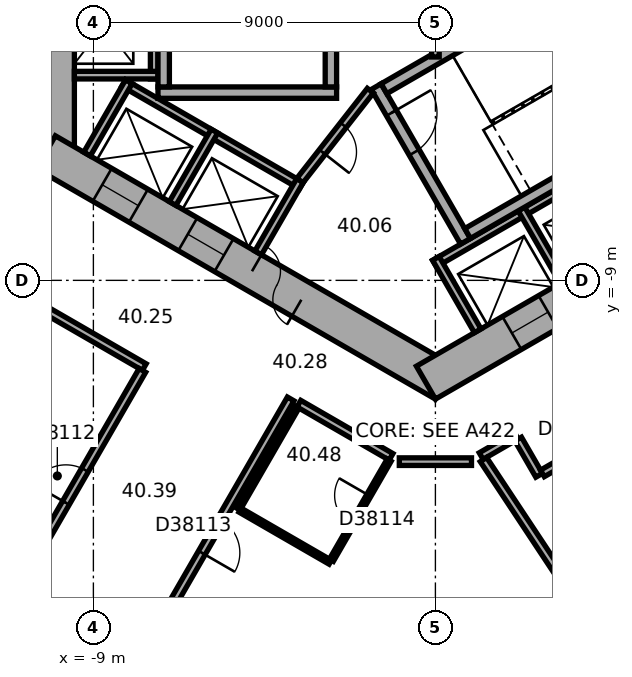
"""IFC4 building model, lengths in metres.
Left out: names, types, materials, properties, quantities, classifications, styles, units other than length and angle.
Written with IfcOpenShell. Run it as: python <this file> out.ifc"""

import sys

from ifc_helpers import new_model, si_unit, direction, frame, frame_2d, origin, place, context, subcontext, project, spatial, rectangle, extrude, element, fill, save


model = new_model("IFC4")
c1 = context("Model", 3, precision=1e-05, world=origin(), true_north=direction((0.0, 1.0)))
c2 = subcontext(c1, "Body", "Model", "MODEL_VIEW")
j1 = project(units=[si_unit("LENGTHUNIT", "METRE"), si_unit("PLANEANGLEUNIT", "RADIAN")], contexts=[c1])
p1 = place(None, origin())
s1 = spatial("IfcSite", under=j1, at=p1, CompositionType="ELEMENT")
p2 = place(p1, origin())
s2 = spatial("IfcBuilding", under=s1, at=p2, CompositionType="ELEMENT")
p3 = place(p2, frame((0.0, 0.0, 165.1)))
s3 = spatial("IfcBuildingStorey", under=s2, at=p3, CompositionType="ELEMENT", Elevation=165.1)
p4 = place(p3, frame((-10.0, 6.062, 0.0), z_axis=(0.0, 0.0, 1.0), x_axis=(0.0, -1.0, 0.0)))
e1 = element("IfcWall", 1, at=p4, inside=s3, PredefinedType="SHEAR", context=c2, shape_type="SweptSolid", body=[
    extrude(rectangle(XDim=12.125, YDim=1.0, at=frame_2d((6.062, 0.0))), origin(), (0.0, 0.0, 1.0), 3.7),
])
p5 = place(p4, frame((5.212, 0.0, 0.0)))
e2 = element("IfcOpeningElement", 2, at=p5, cuts=e1, PredefinedType="OPENING", context=c2, shape_type="SweptSolid", body=[
    extrude(rectangle(XDim=1.1, YDim=2.1, at=frame_2d((0.55, 1.05))), frame((0.0, 0.51, 0.0), z_axis=(0.0, -1.0, 0.0), x_axis=(1.0, 0.0, 0.0)), (0.0, 0.0, 1.0), 1.02),
])
p6 = place(p4, frame((7.812, 0.0, 0.0)))
e3 = element("IfcOpeningElement", 3, at=p6, cuts=e1, PredefinedType="OPENING", context=c2, shape_type="SweptSolid", body=[
    extrude(rectangle(XDim=1.1, YDim=2.1, at=frame_2d((0.55, 1.05))), frame((0.0, 0.51, 0.0), z_axis=(0.0, -1.0, 0.0), x_axis=(1.0, 0.0, 0.0)), (0.0, 0.0, 1.0), 1.02),
])
p7 = place(p3, frame((-10.25, -5.629, 0.0), z_axis=(0.0, 0.0, 1.0), x_axis=(0.866022616891, -0.50000482701, 0.0)))
e4 = element("IfcWall", 4, at=p7, inside=s3, PredefinedType="SHEAR", context=c2, shape_type="SweptSolid", body=[
    extrude(rectangle(XDim=12.125, YDim=1.0, at=frame_2d((6.062, 0.0))), origin(), (0.0, 0.0, 1.0), 3.7),
])
p8 = place(p7, frame((6.262, 0.0, 0.0)))
e5 = element("IfcOpeningElement", 5, at=p8, cuts=e4, PredefinedType="OPENING", context=c2, shape_type="SweptSolid", body=[
    extrude(rectangle(XDim=1.5, YDim=2.1, at=frame_2d((0.75, 1.05))), frame((0.0, 0.51, 0.0), z_axis=(0.0, -1.0, 0.0), x_axis=(1.0, 0.0, 0.0)), (0.0, 0.0, 1.0), 1.02),
])
p9 = place(p7, frame((1.712, 0.0, 0.0)))
e6 = element("IfcOpeningElement", 6, at=p9, cuts=e4, PredefinedType="OPENING", context=c2, shape_type="SweptSolid", body=[
    extrude(rectangle(XDim=1.1, YDim=2.1, at=frame_2d((0.55, 1.05))), frame((0.0, 0.51, 0.0), z_axis=(0.0, -1.0, 0.0), x_axis=(1.0, 0.0, 0.0)), (0.0, 0.0, 1.0), 1.02),
])
p10 = place(p7, frame((4.312, 0.0, 0.0)))
e7 = element("IfcOpeningElement", 7, at=p10, cuts=e4, PredefinedType="OPENING", context=c2, shape_type="SweptSolid", body=[
    extrude(rectangle(XDim=1.1, YDim=2.1, at=frame_2d((0.55, 1.05))), frame((0.0, 0.51, 0.0), z_axis=(0.0, -1.0, 0.0), x_axis=(1.0, 0.0, 0.0)), (0.0, 0.0, 1.0), 1.02),
])
p11 = place(p3, frame((-0.25, -11.691, 0.0), z_axis=(0.0, 0.0, 1.0), x_axis=(0.866022616891, 0.50000482701, 0.0)))
e8 = element("IfcWall", 8, at=p11, inside=s3, PredefinedType="SHEAR", context=c2, shape_type="SweptSolid", body=[
    extrude(rectangle(XDim=12.125, YDim=1.0, at=frame_2d((6.062, 0.0))), origin(), (0.0, 0.0, 1.0), 3.7),
])
p12 = place(p11, frame((2.612, 0.0, 0.0)))
e9 = element("IfcOpeningElement", 9, at=p12, cuts=e8, PredefinedType="OPENING", context=c2, shape_type="SweptSolid", body=[
    extrude(rectangle(XDim=1.1, YDim=2.1, at=frame_2d((0.55, 1.05))), frame((0.0, 0.51, 0.0), z_axis=(0.0, -1.0, 0.0), x_axis=(1.0, 0.0, 0.0)), (0.0, 0.0, 1.0), 1.02),
])
p13 = place(p11, frame((5.212, 0.0, 0.0)))
e10 = element("IfcOpeningElement", 10, at=p13, cuts=e8, PredefinedType="OPENING", context=c2, shape_type="SweptSolid", body=[
    extrude(rectangle(XDim=1.1, YDim=2.1, at=frame_2d((0.55, 1.05))), frame((0.0, 0.51, 0.0), z_axis=(0.0, -1.0, 0.0), x_axis=(1.0, 0.0, 0.0)), (0.0, 0.0, 1.0), 1.02),
])
p14 = place(p11, frame((7.812, 0.0, 0.0)))
e11 = element("IfcOpeningElement", 11, at=p14, cuts=e8, PredefinedType="OPENING", context=c2, shape_type="SweptSolid", body=[
    extrude(rectangle(XDim=1.1, YDim=2.1, at=frame_2d((0.55, 1.05))), frame((0.0, 0.51, 0.0), z_axis=(0.0, -1.0, 0.0), x_axis=(1.0, 0.0, 0.0)), (0.0, 0.0, 1.0), 1.02),
])
p15 = place(p3, frame((-18.789, -14.267, 0.0), z_axis=(0.0, 0.0, 1.0), x_axis=(0.866023315909, -0.500003616288, 0.0)))
e12 = element("IfcWall", 12, at=p15, inside=s3, PredefinedType="STANDARD", context=c2, shape_type="SweptSolid", body=[
    extrude(rectangle(XDim=20.044, YDim=0.2, at=frame_2d((10.022, 0.0))), origin(), (0.0, 0.0, 1.0), 3.7),
])
p16 = place(p15, frame((1.314, 0.0, 0.9)))
e13 = element("IfcOpeningElement", 13, at=p16, cuts=e12, PredefinedType="OPENING", context=c2, shape_type="SweptSolid", body=[
    extrude(rectangle(XDim=2.4, YDim=2.0, at=frame_2d((1.2, 1.0))), frame((0.0, 0.11, 0.0), z_axis=(0.0, -1.0, 0.0), x_axis=(1.0, 0.0, 0.0)), (0.0, 0.0, 1.0), 0.22),
])
p17 = place(p15, frame((5.069, 0.0, 0.9)))
e14 = element("IfcOpeningElement", 14, at=p17, cuts=e12, PredefinedType="OPENING", context=c2, shape_type="SweptSolid", body=[
    extrude(rectangle(XDim=2.4, YDim=2.0, at=frame_2d((1.2, 1.0))), frame((0.0, 0.11, 0.0), z_axis=(0.0, -1.0, 0.0), x_axis=(1.0, 0.0, 0.0)), (0.0, 0.0, 1.0), 0.22),
])
p18 = place(p15, frame((8.823, 0.0, 0.9)))
e15 = element("IfcOpeningElement", 15, at=p18, cuts=e12, PredefinedType="OPENING", context=c2, shape_type="SweptSolid", body=[
    extrude(rectangle(XDim=2.4, YDim=2.0, at=frame_2d((1.2, 1.0))), frame((0.0, 0.11, 0.0), z_axis=(0.0, -1.0, 0.0), x_axis=(1.0, 0.0, 0.0)), (0.0, 0.0, 1.0), 0.22),
])
p19 = place(p15, frame((12.577, 0.0, 0.9)))
e16 = element("IfcOpeningElement", 16, at=p19, cuts=e12, PredefinedType="OPENING", context=c2, shape_type="SweptSolid", body=[
    extrude(rectangle(XDim=2.4, YDim=2.0, at=frame_2d((1.2, 1.0))), frame((0.0, 0.11, 0.0), z_axis=(0.0, -1.0, 0.0), x_axis=(1.0, 0.0, 0.0)), (0.0, 0.0, 1.0), 0.22),
])
p20 = place(p15, frame((16.331, 0.0, 0.9)))
e17 = element("IfcOpeningElement", 17, at=p20, cuts=e12, PredefinedType="OPENING", context=c2, shape_type="SweptSolid", body=[
    extrude(rectangle(XDim=2.4, YDim=2.0, at=frame_2d((1.2, 1.0))), frame((0.0, 0.11, 0.0), z_axis=(0.0, -1.0, 0.0), x_axis=(1.0, 0.0, 0.0)), (0.0, 0.0, 1.0), 0.22),
])
p21 = place(p3, frame((2.911, -24.156, 0.0), z_axis=(0.0, 0.0, 1.0), x_axis=(0.833882163564, 0.551942512668, 0.0)))
e18 = element("IfcWall", 18, at=p21, inside=s3, PredefinedType="STANDARD", context=c2, shape_type="SweptSolid", body=[
    extrude(rectangle(XDim=20.044, YDim=0.2, at=frame_2d((10.022, 0.0))), origin(), (0.0, 0.0, 1.0), 3.7),
])
p22 = place(p21, frame((1.313, 0.0, 0.9)))
e19 = element("IfcOpeningElement", 19, at=p22, cuts=e18, PredefinedType="OPENING", context=c2, shape_type="SweptSolid", body=[
    extrude(rectangle(XDim=2.4, YDim=2.0, at=frame_2d((1.2, 1.0))), frame((0.0, 0.11, 0.0), z_axis=(0.0, -1.0, 0.0), x_axis=(1.0, 0.0, 0.0)), (0.0, 0.0, 1.0), 0.22),
])
p23 = place(p21, frame((5.067, 0.0, 0.9)))
e20 = element("IfcOpeningElement", 20, at=p23, cuts=e18, PredefinedType="OPENING", context=c2, shape_type="SweptSolid", body=[
    extrude(rectangle(XDim=2.4, YDim=2.0, at=frame_2d((1.2, 1.0))), frame((0.0, 0.11, 0.0), z_axis=(0.0, -1.0, 0.0), x_axis=(1.0, 0.0, 0.0)), (0.0, 0.0, 1.0), 0.22),
])
p24 = place(p21, frame((8.821, 0.0, 0.9)))
e21 = element("IfcOpeningElement", 21, at=p24, cuts=e18, PredefinedType="OPENING", context=c2, shape_type="SweptSolid", body=[
    extrude(rectangle(XDim=2.4, YDim=2.0, at=frame_2d((1.2, 1.0))), frame((0.0, 0.11, 0.0), z_axis=(0.0, -1.0, 0.0), x_axis=(1.0, 0.0, 0.0)), (0.0, 0.0, 1.0), 0.22),
])
p25 = place(p21, frame((12.575, 0.0, 0.9)))
e22 = element("IfcOpeningElement", 22, at=p25, cuts=e18, PredefinedType="OPENING", context=c2, shape_type="SweptSolid", body=[
    extrude(rectangle(XDim=2.4, YDim=2.0, at=frame_2d((1.2, 1.0))), frame((0.0, 0.11, 0.0), z_axis=(0.0, -1.0, 0.0), x_axis=(1.0, 0.0, 0.0)), (0.0, 0.0, 1.0), 0.22),
])
p26 = place(p21, frame((16.329, 0.0, 0.9)))
e23 = element("IfcOpeningElement", 23, at=p26, cuts=e18, PredefinedType="OPENING", context=c2, shape_type="SweptSolid", body=[
    extrude(rectangle(XDim=2.4, YDim=2.0, at=frame_2d((1.2, 1.0))), frame((0.0, 0.11, 0.0), z_axis=(0.0, -1.0, 0.0), x_axis=(1.0, 0.0, 0.0)), (0.0, 0.0, 1.0), 0.22),
])
p27 = place(p3, frame((-7.4, 4.3, 0.0), z_axis=(0.0, 0.0, 1.0), x_axis=(0.0, -1.0, 0.0)))
e24 = element("IfcWall", 24, at=p27, inside=s3, PredefinedType="PARTITIONING", context=c2, shape_type="SweptSolid", body=[
    extrude(rectangle(XDim=8.0, YDim=0.2, at=frame_2d((4.0, 0.0))), origin(), (0.0, 0.0, 1.0), 3.42),
])
p28 = place(p3, frame((-7.3, -3.6, 0.0), z_axis=(0.0, 0.0, 1.0), x_axis=(-1.0, 0.0, 0.0)))
e25 = element("IfcWall", 25, at=p28, inside=s3, PredefinedType="PARTITIONING", context=c2, shape_type="SweptSolid", body=[
    extrude(rectangle(XDim=2.2, YDim=0.2, at=frame_2d((1.1, 0.0))), origin(), (0.0, 0.0, 1.0), 3.42),
])
p29 = place(p3, frame((-8.203, -3.809, 0.0), z_axis=(0.0, 0.0, 1.0), x_axis=(0.866028230842, -0.499995103361, 0.0)))
e26 = element("IfcWall", 26, at=p29, inside=s3, PredefinedType="PARTITIONING", context=c2, shape_type="SweptSolid", body=[
    extrude(rectangle(XDim=5.4, YDim=0.2, at=frame_2d((2.7, 0.0))), origin(), (0.0, 0.0, 1.0), 3.42),
])
for number, where, z_axis, x_axis in (
    (27, (-8.067, -3.772, 0.0), (0.0, 0.0, 1.0), (-0.5, -0.866, 0.0)),
    (28, (-5.815, -5.072, 0.0), (0.0, 0.0, 1.0), (-0.5, -0.866, 0.0)),
):
    element("IfcWall", number, at=place(p3, frame(where, z_axis=z_axis, x_axis=x_axis)), inside=s3, PredefinedType="PARTITIONING", context=c2, shape_type="SweptSolid", body=[
        extrude(rectangle(XDim=2.2, YDim=0.2, at=frame_2d((1.1, 0.0))), origin(), (0.0, 0.0, 1.0), 3.42),
    ])
p30 = place(p3, frame((-3.563, -6.372, 0.0), z_axis=(0.0, 0.0, 1.0), x_axis=(-0.499994660107, -0.866028486751, 0.0)))
e29 = element("IfcWall", 29, at=p30, inside=s3, PredefinedType="PARTITIONING", context=c2, shape_type="SweptSolid", body=[
    extrude(rectangle(XDim=2.2, YDim=0.2, at=frame_2d((1.1, 0.0))), origin(), (0.0, 0.0, 1.0), 3.42),
])
p31 = place(p3, frame((-0.024, -8.559, 0.0), z_axis=(0.0, 0.0, 1.0), x_axis=(0.866026010844, 0.49999894854, 0.0)))
e30 = element("IfcWall", 30, at=p31, inside=s3, PredefinedType="PARTITIONING", context=c2, shape_type="SweptSolid", body=[
    extrude(rectangle(XDim=8.0, YDim=0.2, at=frame_2d((4.0, 0.0))), origin(), (0.0, 0.0, 1.0), 3.42),
])
for number, where, z_axis, x_axis in (
    (31, (0.013, -8.422, 0.0), (0.0, 0.0, 1.0), (0.5, -0.866, 0.0)),
    (32, (2.264, -7.122, 0.0), (0.0, 0.0, 1.0), (0.5, -0.866, 0.0)),
):
    element("IfcWall", number, at=place(p3, frame(where, z_axis=z_axis, x_axis=x_axis)), inside=s3, PredefinedType="PARTITIONING", context=c2, shape_type="SweptSolid", body=[
        extrude(rectangle(XDim=2.2, YDim=0.2, at=frame_2d((1.1, 0.0))), origin(), (0.0, 0.0, 1.0), 3.42),
    ])
p32 = place(p3, frame((-2.6, -4.06, 0.0), z_axis=(0.0, 0.0, 1.0), x_axis=(-1.0, 0.0, 0.0)))
e33 = element("IfcWall", 33, at=p32, inside=s3, PredefinedType="SHEAR", context=c2, shape_type="SweptSolid", body=[
    extrude(rectangle(XDim=4.7, YDim=0.3, at=frame_2d((2.35, 0.0))), origin(), (0.0, 0.0, 1.0), 3.42),
])
for number, where, z_axis, x_axis in (
    (34, (-2.75, 3.15, 0.0), (0.0, 0.0, 1.0), (0.0, -1.0, 0.0)),
    (35, (-7.15, 3.15, 0.0), (0.0, 0.0, 1.0), (0.0, -1.0, 0.0)),
):
    element("IfcWall", number, at=place(p3, frame(where, z_axis=z_axis, x_axis=x_axis)), inside=s3, PredefinedType="SHEAR", context=c2, shape_type="SweptSolid", body=[
        extrude(rectangle(XDim=7.06, YDim=0.3, at=frame_2d((3.53, 0.0))), origin(), (0.0, 0.0, 1.0), 3.42),
    ])
p33 = place(p3, frame((-1.558, -3.902, 0.0), z_axis=(0.0, 0.0, 1.0), x_axis=(0.499977259774, -0.866038532462, 0.0)))
e36 = element("IfcWall", 36, at=p33, inside=s3, PredefinedType="SHEAR", context=c2, shape_type="SweptSolid", body=[
    extrude(rectangle(XDim=4.7, YDim=0.3, at=frame_2d((2.35, 0.0))), origin(), (0.0, 0.0, 1.0), 3.42),
])
p34 = place(p33, frame((0.8, 0.0, 0.0)))
e37 = element("IfcOpeningElement", 37, at=p34, cuts=e36, PredefinedType="OPENING", context=c2, shape_type="SweptSolid", body=[
    extrude(rectangle(XDim=1.2, YDim=2.1, at=frame_2d((0.6, 1.05))), frame((0.0, 0.16, 0.0), z_axis=(0.0, -1.0, 0.0), x_axis=(1.0, 0.0, 0.0)), (0.0, 0.0, 1.0), 0.32),
])
for number, where, z_axis, x_axis in (
    (38, (-1.353, -3.957, 0.0), (0.0, 0.0, 1.0), (0.866, 0.5, 0.0)),
    (39, (0.847, -7.767, 0.0), (0.0, 0.0, 1.0), (0.866, 0.5, 0.0)),
):
    element("IfcWall", number, at=place(p3, frame(where, z_axis=z_axis, x_axis=x_axis)), inside=s3, PredefinedType="SHEAR", context=c2, shape_type="SweptSolid", body=[
        extrude(rectangle(XDim=7.06, YDim=0.3, at=frame_2d((3.53, 0.0))), origin(), (0.0, 0.0, 1.0), 3.42),
    ])
p35 = place(p3, frame((-1.712, -4.008, 0.0), z_axis=(0.0, 0.0, 1.0), x_axis=(-0.616549420702, -0.787316208287, 0.0)))
e40 = element("IfcWall", 40, at=p35, inside=s3, PredefinedType="PARTITIONING", context=c2, shape_type="SweptSolid", body=[
    extrude(rectangle(XDim=3.002, YDim=0.2, at=frame_2d((1.501, 0.0))), origin(), (0.0, 0.0, 1.0), 3.42),
])
p36 = place(p35, frame((1.15, 0.0, 0.0)))
e41 = element("IfcOpeningElement", 41, at=p36, cuts=e40, PredefinedType="OPENING", context=c2, shape_type="SweptSolid", body=[
    extrude(rectangle(XDim=0.9, YDim=2.1, at=frame_2d((0.45, 1.05))), frame((0.0, 0.11, 0.0), z_axis=(0.0, -1.0, 0.0), x_axis=(1.0, 0.0, 0.0)), (0.0, 0.0, 1.0), 0.22),
])
p37 = place(p3, frame((0.0, -3.122, 0.0), z_axis=(0.0, 0.0, 1.0), x_axis=(0.0, 1.0, 0.0)))
e42 = element("IfcWall", 42, at=p37, inside=s3, PredefinedType="PARTITIONING", context=c2, shape_type="SweptSolid", body=[
    extrude(rectangle(XDim=6.245, YDim=0.2, at=frame_2d((3.122, 0.0))), origin(), (0.0, 0.0, 1.0), 3.42),
])
p38 = place(p3, frame((-11.651, -8.978, 0.0), z_axis=(0.0, 0.0, 1.0), x_axis=(0.866010893236, -0.500025132165, 0.0)))
e43 = element("IfcWall", 43, at=p38, inside=s3, PredefinedType="PARTITIONING", context=c2, shape_type="SweptSolid", body=[
    extrude(rectangle(XDim=4.608, YDim=0.2, at=frame_2d((2.304, 0.0))), origin(), (0.0, 0.0, 1.0), 3.42),
])
p39 = place(p3, frame((-11.235, -17.474, 0.0), z_axis=(0.0, 0.0, 1.0), x_axis=(0.500009260695, 0.866020057054, 0.0)))
e44 = element("IfcWall", 44, at=p39, inside=s3, PredefinedType="PARTITIONING", context=c2, shape_type="SweptSolid", body=[
    extrude(rectangle(XDim=7.049, YDim=0.2, at=frame_2d((3.524, 0.0))), origin(), (0.0, 0.0, 1.0), 2.87),
])
p40 = place(p39, frame((3.024, 0.0, 0.0)))
e45 = element("IfcOpeningElement", 45, at=p40, cuts=e44, PredefinedType="OPENING", context=c2, shape_type="SweptSolid", body=[
    extrude(rectangle(XDim=1.0, YDim=2.1, at=frame_2d((0.5, 1.05))), frame((0.0, 0.11, 0.0), z_axis=(0.0, -1.0, 0.0), x_axis=(1.0, 0.0, 0.0)), (0.0, 0.0, 1.0), 0.22),
])
p41 = place(p3, frame((-7.984, -19.351, 0.0), z_axis=(0.0, 0.0, 1.0), x_axis=(0.500010139422, 0.866019549707, 0.0)))
e46 = element("IfcWall", 46, at=p41, inside=s3, PredefinedType="PARTITIONING", context=c2, shape_type="SweptSolid", body=[
    extrude(rectangle(XDim=8.35, YDim=0.2, at=frame_2d((4.175, 0.0))), origin(), (0.0, 0.0, 1.0), 3.42),
])
p42 = place(p41, frame((3.675, 0.0, 0.0)))
e47 = element("IfcOpeningElement", 47, at=p42, cuts=e46, PredefinedType="OPENING", context=c2, shape_type="SweptSolid", body=[
    extrude(rectangle(XDim=1.0, YDim=2.1, at=frame_2d((0.5, 1.05))), frame((0.0, 0.11, 0.0), z_axis=(0.0, -1.0, 0.0), x_axis=(1.0, 0.0, 0.0)), (0.0, 0.0, 1.0), 0.22),
])
p43 = place(p3, frame((-5.192, -15.016, 0.0), z_axis=(0.0, 0.0, 1.0), x_axis=(0.500026960575, 0.86600983753, 0.0)))
e48 = element("IfcWall", 48, at=p43, inside=s3, PredefinedType="PARTITIONING", context=c2, shape_type="SweptSolid", body=[
    extrude(rectangle(XDim=3.1, YDim=0.12, at=frame_2d((1.55, 0.0))), origin(), (0.0, 0.0, 1.0), 3.42),
])
p44 = place(p3, frame((-3.592, -12.244, 0.0), z_axis=(0.0, 0.0, 1.0), x_axis=(0.866034573852, -0.49998411664, 0.0)))
e49 = element("IfcWall", 49, at=p44, inside=s3, PredefinedType="PARTITIONING", context=c2, shape_type="SweptSolid", body=[
    extrude(rectangle(XDim=2.8, YDim=0.2, at=frame_2d((1.4, 0.0))), origin(), (0.0, 0.0, 1.0), 3.42),
])
p45 = place(p3, frame((-2.767, -16.416, 0.0), z_axis=(0.0, 0.0, 1.0), x_axis=(-0.865997131366, 0.500048966069, 0.0)))
e50 = element("IfcWall", 50, at=p45, inside=s3, PredefinedType="PARTITIONING", context=c2, shape_type="SweptSolid", body=[
    extrude(rectangle(XDim=2.74, YDim=0.12, at=frame_2d((1.37, 0.0))), origin(), (0.0, 0.0, 1.0), 3.42),
])
p46 = place(p3, frame((-1.217, -13.731, 0.0), z_axis=(0.0, 0.0, 1.0), x_axis=(-0.499991248344, -0.866030456496, 0.0)))
e51 = element("IfcWall", 51, at=p46, inside=s3, PredefinedType="PARTITIONING", context=c2, shape_type="SweptSolid", body=[
    extrude(rectangle(XDim=3.04, YDim=0.12, at=frame_2d((1.52, 0.0))), origin(), (0.0, 0.0, 1.0), 3.42),
])
p47 = place(p46, frame((1.07, 0.0, 0.0)))
e52 = element("IfcOpeningElement", 52, at=p47, cuts=e51, PredefinedType="OPENING", context=c2, shape_type="SweptSolid", body=[
    extrude(rectangle(XDim=0.9, YDim=2.1, at=frame_2d((0.45, 1.05))), frame((0.0, 0.07, 0.0), z_axis=(0.0, -1.0, 0.0), x_axis=(1.0, 0.0, 0.0)), (0.0, 0.0, 1.0), 0.14),
])
p48 = place(p3, frame((-0.95, -13.77, 0.0), z_axis=(0.0, 0.0, 1.0), x_axis=(1.0, 0.0, 0.0)))
e53 = element("IfcWall", 53, at=p48, inside=s3, PredefinedType="PARTITIONING", context=c2, shape_type="SweptSolid", body=[
    extrude(rectangle(XDim=1.9, YDim=0.2, at=frame_2d((0.95, 0.0))), origin(), (0.0, 0.0, 1.0), 3.42),
])
p49 = place(p3, frame((1.204, -13.623, 0.0), z_axis=(0.0, 0.0, 1.0), x_axis=(0.866040989419, 0.499973003918, 0.0)))
e54 = element("IfcWall", 54, at=p49, inside=s3, PredefinedType="PARTITIONING", context=c2, shape_type="SweptSolid", body=[
    extrude(rectangle(XDim=1.068, YDim=0.2, at=frame_2d((0.534, 0.0))), origin(), (0.0, 0.0, 1.0), 3.42),
])
p50 = place(p3, frame((2.179, -13.176, 0.0), z_axis=(0.0, 0.0, 1.0), x_axis=(0.499978356969, -0.866037899034, 0.0)))
e55 = element("IfcWall", 55, at=p50, inside=s3, PredefinedType="PARTITIONING", context=c2, shape_type="SweptSolid", body=[
    extrude(rectangle(XDim=1.101, YDim=0.2, at=frame_2d((0.551, 0.0))), origin(), (0.0, 0.0, 1.0), 3.42),
])
p51 = place(p3, frame((2.816, -14.079, 0.0), z_axis=(0.0, 0.0, 1.0), x_axis=(0.866021128829, 0.500007404367, 0.0)))
e56 = element("IfcWall", 56, at=p51, inside=s3, PredefinedType="PARTITIONING", context=c2, shape_type="SweptSolid", body=[
    extrude(rectangle(XDim=8.702, YDim=0.2, at=frame_2d((4.351, 0.0))), origin(), (0.0, 0.0, 1.0), 3.42),
])
p52 = place(p51, frame((0.833, 0.0, 0.0)))
e57 = element("IfcOpeningElement", 57, at=p52, cuts=e56, PredefinedType="OPENING", context=c2, shape_type="SweptSolid", body=[
    extrude(rectangle(XDim=1.0, YDim=2.1, at=frame_2d((0.5, 1.05))), frame((0.0, 0.11, 0.0), z_axis=(0.0, -1.0, 0.0), x_axis=(1.0, 0.0, 0.0)), (0.0, 0.0, 1.0), 0.22),
])
p53 = place(p3, frame((6.02, -20.899, 0.0), z_axis=(0.0, 0.0, 1.0), x_axis=(-0.551943990108, 0.833881185651, 0.0)))
e58 = element("IfcWall", 58, at=p53, inside=s3, PredefinedType="PARTITIONING", context=c2, shape_type="SweptSolid", body=[
    extrude(rectangle(XDim=8.615, YDim=0.2, at=frame_2d((4.308, 0.0))), origin(), (0.0, 0.0, 1.0), 3.42),
])
p54 = place(p8, origin())
e59 = element("IfcDoor", 59, at=p54, inside=s3, OperationType="DOUBLE_DOOR_SINGLE_SWING", PredefinedType="DOOR", context=c2, shape_type="SweptSolid", body=[
    extrude(rectangle(XDim=1.5, YDim=2.1, at=frame_2d((0.75, 1.05))), frame((0.0, 0.025, 0.0), z_axis=(0.0, -1.0, 0.0), x_axis=(1.0, 0.0, 0.0)), (0.0, 0.0, 1.0), 0.05),
])
fill(e5, e59)
p55 = place(p34, origin())
e60 = element("IfcDoor", 60, at=p55, inside=s3, OperationType="SINGLE_SWING_RIGHT", PredefinedType="DOOR", context=c2, shape_type="SweptSolid", body=[
    extrude(rectangle(XDim=1.2, YDim=2.1, at=frame_2d((0.6, 1.05))), frame((0.0, 0.025, 0.0), z_axis=(0.0, -1.0, 0.0), x_axis=(1.0, 0.0, 0.0)), (0.0, 0.0, 1.0), 0.05),
])
fill(e37, e60)
p56 = place(p36, origin())
e61 = element("IfcDoor", 61, at=p56, inside=s3, OperationType="SINGLE_SWING_LEFT", PredefinedType="DOOR", context=c2, shape_type="SweptSolid", body=[
    extrude(rectangle(XDim=0.9, YDim=2.1, at=frame_2d((0.45, 1.05))), frame((0.0, 0.025, 0.0), z_axis=(0.0, -1.0, 0.0), x_axis=(1.0, 0.0, 0.0)), (0.0, 0.0, 1.0), 0.05),
])
fill(e41, e61)
p57 = place(p9, origin())
e62 = element("IfcDoor", 62, at=p57, inside=s3, OperationType="DOUBLE_DOOR_SLIDING", PredefinedType="DOOR", context=c2, shape_type="SweptSolid", body=[
    extrude(rectangle(XDim=1.1, YDim=2.1, at=frame_2d((0.55, 1.05))), frame((0.0, 0.025, 0.0), z_axis=(0.0, -1.0, 0.0), x_axis=(1.0, 0.0, 0.0)), (0.0, 0.0, 1.0), 0.05),
])
fill(e6, e62)
p58 = place(p10, origin())
e63 = element("IfcDoor", 63, at=p58, inside=s3, OperationType="DOUBLE_DOOR_SLIDING", PredefinedType="DOOR", context=c2, shape_type="SweptSolid", body=[
    extrude(rectangle(XDim=1.1, YDim=2.1, at=frame_2d((0.55, 1.05))), frame((0.0, 0.025, 0.0), z_axis=(0.0, -1.0, 0.0), x_axis=(1.0, 0.0, 0.0)), (0.0, 0.0, 1.0), 0.05),
])
fill(e7, e63)
p59 = place(p12, origin())
e64 = element("IfcDoor", 64, at=p59, inside=s3, OperationType="DOUBLE_DOOR_SLIDING", PredefinedType="DOOR", context=c2, shape_type="SweptSolid", body=[
    extrude(rectangle(XDim=1.1, YDim=2.1, at=frame_2d((0.55, 1.05))), frame((0.0, 0.025, 0.0), z_axis=(0.0, -1.0, 0.0), x_axis=(1.0, 0.0, 0.0)), (0.0, 0.0, 1.0), 0.05),
])
fill(e9, e64)
p60 = place(p40, origin())
e65 = element("IfcDoor", 65, at=p60, inside=s3, OperationType="SINGLE_SWING_LEFT", PredefinedType="DOOR", context=c2, shape_type="SweptSolid", body=[
    extrude(rectangle(XDim=1.0, YDim=2.1, at=frame_2d((0.5, 1.05))), frame((0.0, 0.025, 0.0), z_axis=(0.0, -1.0, 0.0), x_axis=(1.0, 0.0, 0.0)), (0.0, 0.0, 1.0), 0.05),
])
fill(e45, e65)
p61 = place(p42, origin())
e66 = element("IfcDoor", 66, at=p61, inside=s3, OperationType="SINGLE_SWING_LEFT", PredefinedType="DOOR", context=c2, shape_type="SweptSolid", body=[
    extrude(rectangle(XDim=1.0, YDim=2.1, at=frame_2d((0.5, 1.05))), frame((0.0, 0.025, 0.0), z_axis=(0.0, -1.0, 0.0), x_axis=(1.0, 0.0, 0.0)), (0.0, 0.0, 1.0), 0.05),
])
fill(e47, e66)
p62 = place(p47, origin())
e67 = element("IfcDoor", 67, at=p62, inside=s3, OperationType="SINGLE_SWING_LEFT", PredefinedType="DOOR", context=c2, shape_type="SweptSolid", body=[
    extrude(rectangle(XDim=0.9, YDim=2.1, at=frame_2d((0.45, 1.05))), frame((0.0, 0.025, 0.0), z_axis=(0.0, -1.0, 0.0), x_axis=(1.0, 0.0, 0.0)), (0.0, 0.0, 1.0), 0.05),
])
fill(e52, e67)
save(model, sys.argv[1])
